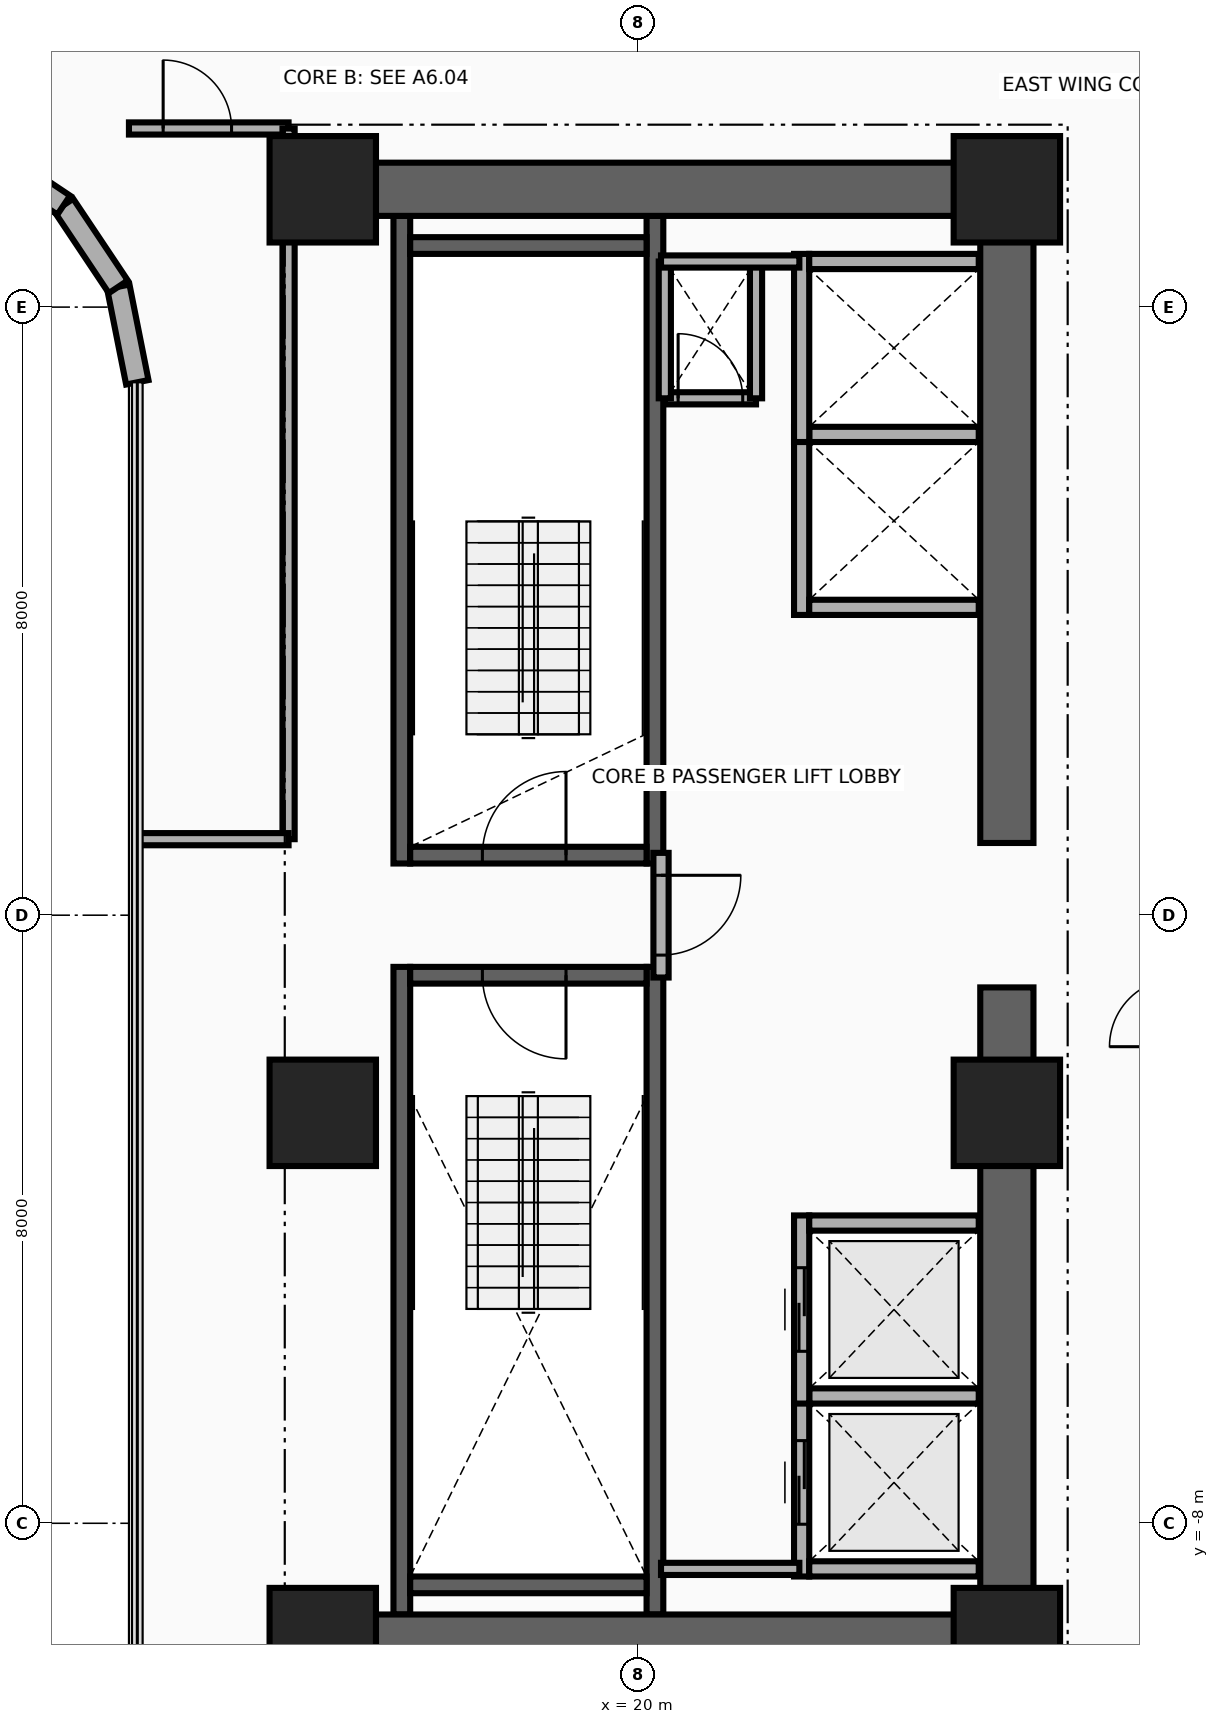
"""IFC4 building model, lengths in metres.
Left out: names, types, materials, properties, quantities, classifications, styles, units other than length and angle.
Written with IfcOpenShell. Run it as: python <this file> out.ifc"""

import sys

from ifc_helpers import new_model, si_unit, direction, frame, frame_2d, origin, origin_2d, place, context, subcontext, project, spatial, rectangle, extrude, source, transform, mapped, element, fill, save


model = new_model("IFC4")
c1 = context("Model", 3, precision=1e-05, world=origin(), true_north=direction((0.0, 1.0)))
c2 = subcontext(c1, "Body", "Model", "MODEL_VIEW")
j1 = project(units=[si_unit("LENGTHUNIT", "METRE"), si_unit("PLANEANGLEUNIT", "RADIAN")], contexts=[c1])
p1 = place(None, origin())
s1 = spatial("IfcSite", under=j1, at=p1, CompositionType="ELEMENT")
p2 = place(p1, origin())
s2 = spatial("IfcBuilding", under=s1, at=p2, CompositionType="ELEMENT")
p3 = place(p2, frame((0.0, 0.0, 33.4)))
s3 = spatial("IfcBuildingStorey", under=s2, at=p3, CompositionType="ELEMENT", Elevation=33.4)
for number, where, z_axis, x_axis in (
    (1, (16.89, 0.68, 0.0), (0.0, 0.0, 1.0), (0.0, 1.0, 0.0)),
    (2, (20.22, 0.68, 0.0), (0.0, 0.0, 1.0), (0.0, 1.0, 0.0)),
):
    element("IfcWall", number, at=place(p3, frame(where, z_axis=z_axis, x_axis=x_axis)), inside=s3, PredefinedType="SHEAR", context=c2, shape_type="SweptSolid", body=[
        extrude(rectangle(XDim=8.52, YDim=0.22, at=frame_2d((4.26, 0.0))), origin(), (0.0, 0.0, 1.0), 3.46),
    ])
p4 = place(p3, frame((17.0, 0.79, 0.0), z_axis=(0.0, 0.0, 1.0), x_axis=(1.0, 0.0, 0.0)))
e3 = element("IfcWall", 3, at=p4, inside=s3, PredefinedType="SHEAR", context=c2, shape_type="SweptSolid", body=[
    extrude(rectangle(XDim=3.11, YDim=0.22, at=frame_2d((1.555, 0.0))), origin(), (0.0, 0.0, 1.0), 3.46),
])
p5 = place(p4, frame((0.95, 0.0, 0.0)))
e4 = element("IfcOpeningElement", 4, at=p5, cuts=e3, PredefinedType="OPENING", context=c2, shape_type="SweptSolid", body=[
    extrude(rectangle(XDim=1.1, YDim=2.15, at=frame_2d((0.55, 1.075))), frame((0.0, 0.125, 0.0), z_axis=(0.0, -1.0, 0.0), x_axis=(1.0, 0.0, 0.0)), (0.0, 0.0, 1.0), 0.25),
])
p6 = place(p3, frame((17.0, 8.81, 0.0), z_axis=(0.0, 0.0, 1.0), x_axis=(1.0, 0.0, 0.0)))
e5 = element("IfcWall", 5, at=p6, inside=s3, PredefinedType="SHEAR", context=c2, shape_type="SweptSolid", body=[
    extrude(rectangle(XDim=3.11, YDim=0.22, at=frame_2d((1.555, 0.0))), origin(), (0.0, 0.0, 1.0), 3.46),
])
for number, where, z_axis, x_axis in (
    (6, (16.89, -9.2, 0.0), (0.0, 0.0, 1.0), (0.0, 1.0, 0.0)),
    (7, (20.22, -9.2, 0.0), (0.0, 0.0, 1.0), (0.0, 1.0, 0.0)),
):
    element("IfcWall", number, at=place(p3, frame(where, z_axis=z_axis, x_axis=x_axis)), inside=s3, PredefinedType="SHEAR", context=c2, shape_type="SweptSolid", body=[
        extrude(rectangle(XDim=8.52, YDim=0.22, at=frame_2d((4.26, 0.0))), origin(), (0.0, 0.0, 1.0), 3.46),
    ])
p7 = place(p3, frame((17.0, -8.81, 0.0), z_axis=(0.0, 0.0, 1.0), x_axis=(1.0, 0.0, 0.0)))
e8 = element("IfcWall", 8, at=p7, inside=s3, PredefinedType="SHEAR", context=c2, shape_type="SweptSolid", body=[
    extrude(rectangle(XDim=3.11, YDim=0.22, at=frame_2d((1.555, 0.0))), origin(), (0.0, 0.0, 1.0), 3.46),
])
p8 = place(p3, frame((17.0, -0.79, 0.0), z_axis=(0.0, 0.0, 1.0), x_axis=(1.0, 0.0, 0.0)))
e9 = element("IfcWall", 9, at=p8, inside=s3, PredefinedType="SHEAR", context=c2, shape_type="SweptSolid", body=[
    extrude(rectangle(XDim=3.11, YDim=0.22, at=frame_2d((1.555, 0.0))), origin(), (0.0, 0.0, 1.0), 3.46),
])
p9 = place(p8, frame((0.95, 0.0, 0.0)))
e10 = element("IfcOpeningElement", 10, at=p9, cuts=e9, PredefinedType="OPENING", context=c2, shape_type="SweptSolid", body=[
    extrude(rectangle(XDim=1.1, YDim=2.15, at=frame_2d((0.55, 1.075))), frame((0.0, 0.125, 0.0), z_axis=(0.0, -1.0, 0.0), x_axis=(1.0, 0.0, 0.0)), (0.0, 0.0, 1.0), 0.25),
])
for number, where, z_axis, x_axis in (
    (11, (24.85, -9.9, 0.0), (0.0, 0.0, 1.0), (0.0, 1.0, 0.0)),
    (12, (24.85, 0.95, 0.0), (0.0, 0.0, 1.0), (0.0, 1.0, 0.0)),
):
    element("IfcWall", number, at=place(p3, frame(where, z_axis=z_axis, x_axis=x_axis)), inside=s3, PredefinedType="SHEAR", context=c2, shape_type="SweptSolid", body=[
        extrude(rectangle(XDim=8.95, YDim=0.7, at=frame_2d((4.475, 0.0))), origin(), (0.0, 0.0, 1.0), 3.46),
    ])
for number, where, z_axis, x_axis in (
    (13, (15.85, 9.55, 0.0), (0.0, 0.0, 1.0), (1.0, 0.0, 0.0)),
    (14, (15.85, -9.55, 0.0), (0.0, 0.0, 1.0), (1.0, 0.0, 0.0)),
):
    element("IfcWall", number, at=place(p3, frame(where, z_axis=z_axis, x_axis=x_axis)), inside=s3, PredefinedType="SHEAR", context=c2, shape_type="SweptSolid", body=[
        extrude(rectangle(XDim=9.0, YDim=0.7, at=frame_2d((4.5, 0.0))), origin(), (0.0, 0.0, 1.0), 3.46),
    ])
m1 = source(origin(), c2, "Body", "SweptSolid", [
    extrude(rectangle(XDim=1.4, YDim=1.4, at=origin_2d()), origin(), (0.0, 0.0, 1.0), 3.7),
])
for number, where, z_axis, x_axis in (
    (15, (15.85, -9.55, 0.0), (0.0, 0.0, 1.0), (1.0, 0.0, 0.0)),
    (16, (24.85, -9.55, 0.0), (0.0, 0.0, 1.0), (1.0, 0.0, 0.0)),
    (17, (15.85, -2.6, 0.0), (0.0, 0.0, 1.0), (1.0, 0.0, 0.0)),
    (18, (24.85, -2.6, 0.0), (0.0, 0.0, 1.0), (1.0, 0.0, 0.0)),
    (19, (15.85, 9.55, 0.0), (0.0, 0.0, 1.0), (1.0, 0.0, 0.0)),
    (20, (24.85, 9.55, 0.0), (0.0, 0.0, 1.0), (1.0, 0.0, 0.0)),
):
    element("IfcColumn", number, at=place(p3, frame(where, z_axis=z_axis, x_axis=x_axis)), inside=s3, PredefinedType="COLUMN", context=c2, shape_type="MappedRepresentation", body=[
        mapped(m1, transform((0.0, 0.0, 0.0), x_axis=(1.0, 0.0, 0.0), y_axis=(0.0, 1.0, 0.0), z_axis=(0.0, 0.0, 1.0), scale=1.0)),
    ])
p10 = place(p3, frame((13.41, 7.011, 0.0), z_axis=(0.0, 0.0, 1.0), x_axis=(-0.195090163074, 0.980785312019, 0.0)))
e21 = element("IfcWall", 21, at=p10, inside=s3, PredefinedType="SOLIDWALL", context=c2, shape_type="SweptSolid", body=[
    extrude(rectangle(XDim=1.281, YDim=0.3, at=frame_2d((0.641, 0.0))), origin(), (0.0, 0.0, 1.0), 3.46),
])
for number, where, z_axis, x_axis in (
    (22, (13.16, 8.268, 0.0), (0.0, 0.0, 1.0), (-0.556, 0.831, 0.0)),
    (23, (12.442, 9.342, 0.0), (0.0, 0.0, 1.0), (-0.831, 0.556, 0.0)),
):
    element("IfcWall", number, at=place(p3, frame(where, z_axis=z_axis, x_axis=x_axis)), inside=s3, PredefinedType="SOLIDWALL", context=c2, shape_type="SweptSolid", body=[
        extrude(rectangle(XDim=1.292, YDim=0.3, at=frame_2d((0.646, 0.0))), origin(), (0.0, 0.0, 1.0), 3.46),
    ])
p11 = place(p3, frame((22.15, -8.7, 0.0), z_axis=(0.0, 0.0, 1.0), x_axis=(0.0, 1.0, 0.0)))
e24 = element("IfcWall", 24, at=p11, inside=s3, PredefinedType="MOVABLE", context=c2, shape_type="SweptSolid", body=[
    extrude(rectangle(XDim=2.475, YDim=0.2, at=frame_2d((1.237, 0.0))), origin(), (0.0, 0.0, 1.0), 3.46),
])
p12 = place(p11, frame((0.688, 0.0, 0.0)))
e25 = element("IfcOpeningElement", 25, at=p12, cuts=e24, PredefinedType="OPENING", context=c2, shape_type="SweptSolid", body=[
    extrude(rectangle(XDim=1.1, YDim=2.1, at=frame_2d((0.55, 1.05))), frame((0.0, 0.115, 0.0), z_axis=(0.0, -1.0, 0.0), x_axis=(1.0, 0.0, 0.0)), (0.0, 0.0, 1.0), 0.23),
])
for number, where, z_axis, x_axis in (
    (26, (22.25, -8.6, 0.0), (0.0, 0.0, 1.0), (1.0, 0.0, 0.0)),
    (27, (22.25, -6.325, 0.0), (0.0, 0.0, 1.0), (1.0, 0.0, 0.0)),
):
    element("IfcWall", number, at=place(p3, frame(where, z_axis=z_axis, x_axis=x_axis)), inside=s3, PredefinedType="MOVABLE", context=c2, shape_type="SweptSolid", body=[
        extrude(rectangle(XDim=2.23, YDim=0.2, at=frame_2d((1.115, 0.0))), origin(), (0.0, 0.0, 1.0), 3.46),
    ])
p13 = place(p3, frame((22.15, -6.425, 0.0), z_axis=(0.0, 0.0, 1.0), x_axis=(0.0, 1.0, 0.0)))
e28 = element("IfcWall", 28, at=p13, inside=s3, PredefinedType="MOVABLE", context=c2, shape_type="SweptSolid", body=[
    extrude(rectangle(XDim=2.475, YDim=0.2, at=frame_2d((1.238, 0.0))), origin(), (0.0, 0.0, 1.0), 3.46),
])
p14 = place(p13, frame((0.688, 0.0, 0.0)))
e29 = element("IfcOpeningElement", 29, at=p14, cuts=e28, PredefinedType="OPENING", context=c2, shape_type="SweptSolid", body=[
    extrude(rectangle(XDim=1.1, YDim=2.1, at=frame_2d((0.55, 1.05))), frame((0.0, 0.115, 0.0), z_axis=(0.0, -1.0, 0.0), x_axis=(1.0, 0.0, 0.0)), (0.0, 0.0, 1.0), 0.23),
])
p15 = place(p3, frame((22.25, -4.05, 0.0), z_axis=(0.0, 0.0, 1.0), x_axis=(1.0, 0.0, 0.0)))
e30 = element("IfcWall", 30, at=p15, inside=s3, PredefinedType="MOVABLE", context=c2, shape_type="SweptSolid", body=[
    extrude(rectangle(XDim=2.23, YDim=0.2, at=frame_2d((1.115, 0.0))), origin(), (0.0, 0.0, 1.0), 3.46),
])
p16 = place(p3, frame((22.15, 3.95, 0.0), z_axis=(0.0, 0.0, 1.0), x_axis=(0.0, 1.0, 0.0)))
e31 = element("IfcWall", 31, at=p16, inside=s3, PredefinedType="MOVABLE", context=c2, shape_type="SweptSolid", body=[
    extrude(rectangle(XDim=2.475, YDim=0.2, at=frame_2d((1.238, 0.0))), origin(), (0.0, 0.0, 1.0), 3.46),
])
for number, where, z_axis, x_axis in (
    (32, (22.25, 4.05, 0.0), (0.0, 0.0, 1.0), (1.0, 0.0, 0.0)),
    (33, (22.25, 6.325, 0.0), (0.0, 0.0, 1.0), (1.0, 0.0, 0.0)),
):
    element("IfcWall", number, at=place(p3, frame(where, z_axis=z_axis, x_axis=x_axis)), inside=s3, PredefinedType="MOVABLE", context=c2, shape_type="SweptSolid", body=[
        extrude(rectangle(XDim=2.23, YDim=0.2, at=frame_2d((1.115, 0.0))), origin(), (0.0, 0.0, 1.0), 2.245),
    ])
p17 = place(p3, frame((22.15, 6.225, 0.0), z_axis=(0.0, 0.0, 1.0), x_axis=(0.0, 1.0, 0.0)))
e34 = element("IfcWall", 34, at=p17, inside=s3, PredefinedType="MOVABLE", context=c2, shape_type="SweptSolid", body=[
    extrude(rectangle(XDim=2.475, YDim=0.2, at=frame_2d((1.237, 0.0))), origin(), (0.0, 0.0, 1.0), 3.46),
])
p18 = place(p3, frame((22.25, 8.6, 0.0), z_axis=(0.0, 0.0, 1.0), x_axis=(1.0, 0.0, 0.0)))
e35 = element("IfcWall", 35, at=p18, inside=s3, PredefinedType="MOVABLE", context=c2, shape_type="SweptSolid", body=[
    extrude(rectangle(XDim=2.23, YDim=0.2, at=frame_2d((1.115, 0.0))), origin(), (0.0, 0.0, 1.0), 2.245),
])
p19 = place(p3, frame((20.3, -0.82, 0.0), z_axis=(0.0, 0.0, 1.0), x_axis=(0.0, 1.0, 0.0)))
e36 = element("IfcWall", 36, at=p19, inside=s3, PredefinedType="PARTITIONING", context=c2, shape_type="SweptSolid", body=[
    extrude(rectangle(XDim=1.64, YDim=0.2, at=frame_2d((0.82, 0.0))), origin(), (0.0, 0.0, 1.0), 3.46),
])
p20 = place(p19, frame((0.295, 0.0, 0.0)))
e37 = element("IfcOpeningElement", 37, at=p20, cuts=e36, PredefinedType="OPENING", context=c2, shape_type="SweptSolid", body=[
    extrude(rectangle(XDim=1.05, YDim=2.15, at=frame_2d((0.525, 1.075))), frame((0.0, 0.115, 0.0), z_axis=(0.0, -1.0, 0.0), x_axis=(1.0, 0.0, 0.0)), (0.0, 0.0, 1.0), 0.23),
])
p21 = place(p3, frame((20.35, 6.8, 0.0), z_axis=(0.0, 0.0, 1.0), x_axis=(1.0, 0.0, 0.0)))
e38 = element("IfcWall", 38, at=p21, inside=s3, PredefinedType="PARTITIONING", context=c2, shape_type="SweptSolid", body=[
    extrude(rectangle(XDim=1.2, YDim=0.16, at=frame_2d((0.6, 0.0))), origin(), (0.0, 0.0, 1.0), 3.46),
])
p22 = place(p21, frame((0.175, 0.0, 0.0)))
e39 = element("IfcOpeningElement", 39, at=p22, cuts=e38, PredefinedType="OPENING", context=c2, shape_type="SweptSolid", body=[
    extrude(rectangle(XDim=0.85, YDim=2.05, at=frame_2d((0.425, 1.025))), frame((0.0, 0.095, 0.0), z_axis=(0.0, -1.0, 0.0), x_axis=(1.0, 0.0, 0.0)), (0.0, 0.0, 1.0), 0.19),
])
for number, where, z_axis, x_axis in (
    (40, (21.55, 6.8, 0.0), (0.0, 0.0, 1.0), (0.0, 1.0, 0.0)),
    (41, (20.35, 6.8, 0.0), (0.0, 0.0, 1.0), (0.0, 1.0, 0.0)),
):
    element("IfcWall", number, at=place(p3, frame(where, z_axis=z_axis, x_axis=x_axis)), inside=s3, PredefinedType="PARTITIONING", context=c2, shape_type="SweptSolid", body=[
        extrude(rectangle(XDim=1.8, YDim=0.16, at=frame_2d((0.9, 0.0))), origin(), (0.0, 0.0, 1.0), 3.46),
    ])
for number, where, z_axis, x_axis in (
    (42, (20.3, -8.6, 0.0), (0.0, 0.0, 1.0), (1.0, 0.0, 0.0)),
    (43, (20.3, 8.6, 0.0), (0.0, 0.0, 1.0), (1.0, 0.0, 0.0)),
):
    element("IfcWall", number, at=place(p3, frame(where, z_axis=z_axis, x_axis=x_axis)), inside=s3, PredefinedType="PARTITIONING", context=c2, shape_type="SweptSolid", body=[
        extrude(rectangle(XDim=1.82, YDim=0.16, at=frame_2d((0.91, 0.0))), origin(), (0.0, 0.0, 1.0), 3.46),
    ])
p23 = place(p3, frame((13.3, 10.35, 0.0), z_axis=(0.0, 0.0, 1.0), x_axis=(1.0, 0.0, 0.0)))
e44 = element("IfcWall", 44, at=p23, inside=s3, PredefinedType="PARTITIONING", context=c2, shape_type="SweptSolid", body=[
    extrude(rectangle(XDim=2.1, YDim=0.16, at=frame_2d((1.05, 0.0))), origin(), (0.0, 0.0, 1.0), 2.583),
])
p24 = place(p23, frame((0.45, 0.0, 0.0)))
e45 = element("IfcOpeningElement", 45, at=p24, cuts=e44, PredefinedType="OPENING", context=c2, shape_type="SweptSolid", body=[
    extrude(rectangle(XDim=0.9, YDim=2.1, at=frame_2d((0.45, 1.05))), frame((0.0, 0.095, 0.0), z_axis=(0.0, -1.0, 0.0), x_axis=(1.0, 0.0, 0.0)), (0.0, 0.0, 1.0), 0.19),
])
p25 = place(p3, frame((15.4, 1.0, 0.0), z_axis=(0.0, 0.0, 1.0), x_axis=(0.0, 1.0, 0.0)))
e46 = element("IfcWall", 46, at=p25, inside=s3, PredefinedType="PARTITIONING", context=c2, shape_type="SweptSolid", body=[
    extrude(rectangle(XDim=9.35, YDim=0.16, at=frame_2d((4.675, 0.0))), origin(), (0.0, 0.0, 1.0), 2.245),
])
p26 = place(p3, frame((13.41, 1.0, 0.0), z_axis=(0.0, 0.0, 1.0), x_axis=(1.0, 0.0, 0.0)))
e47 = element("IfcWall", 47, at=p26, inside=s3, PredefinedType="PARTITIONING", context=c2, shape_type="SweptSolid", body=[
    extrude(rectangle(XDim=1.99, YDim=0.16, at=frame_2d((0.995, 0.0))), origin(), (0.0, 0.0, 1.0), 2.245),
])
p27 = place(p12, origin())
e48 = element("IfcDoor", 48, at=p27, inside=s3, OperationType="DOUBLE_DOOR_SLIDING", PredefinedType="DOOR", context=c2, shape_type="SweptSolid", body=[
    extrude(rectangle(XDim=1.1, YDim=2.1, at=frame_2d((0.55, 1.05))), frame((0.0, 0.025, 0.0), z_axis=(0.0, -1.0, 0.0), x_axis=(1.0, 0.0, 0.0)), (0.0, 0.0, 1.0), 0.05),
])
fill(e25, e48)
p28 = place(p14, origin())
e49 = element("IfcDoor", 49, at=p28, inside=s3, OperationType="DOUBLE_DOOR_SLIDING", PredefinedType="DOOR", context=c2, shape_type="SweptSolid", body=[
    extrude(rectangle(XDim=1.1, YDim=2.1, at=frame_2d((0.55, 1.05))), frame((0.0, 0.025, 0.0), z_axis=(0.0, -1.0, 0.0), x_axis=(1.0, 0.0, 0.0)), (0.0, 0.0, 1.0), 0.05),
])
fill(e29, e49)
p29 = place(p20, frame((1.05, 0.0, 0.0), z_axis=(0.0, 0.0, 1.0), x_axis=(-1.0, 0.0, 0.0)))
e50 = element("IfcDoor", 50, at=p29, inside=s3, OperationType="SINGLE_SWING_LEFT", PredefinedType="DOOR", context=c2, shape_type="SweptSolid", body=[
    extrude(rectangle(XDim=1.05, YDim=2.15, at=frame_2d((0.525, 1.075))), frame((0.0, 0.025, 0.0), z_axis=(0.0, -1.0, 0.0), x_axis=(1.0, 0.0, 0.0)), (0.0, 0.0, 1.0), 0.05),
])
fill(e37, e50)
p30 = place(p5, origin())
e51 = element("IfcDoor", 51, at=p30, inside=s3, OperationType="SINGLE_SWING_RIGHT", PredefinedType="DOOR", context=c2, shape_type="SweptSolid", body=[
    extrude(rectangle(XDim=1.1, YDim=2.15, at=frame_2d((0.55, 1.075))), frame((0.0, 0.025, 0.0), z_axis=(0.0, -1.0, 0.0), x_axis=(1.0, 0.0, 0.0)), (0.0, 0.0, 1.0), 0.05),
])
fill(e4, e51)
p31 = place(p9, frame((1.1, 0.0, 0.0), z_axis=(0.0, 0.0, 1.0), x_axis=(-1.0, 0.0, 0.0)))
e52 = element("IfcDoor", 52, at=p31, inside=s3, OperationType="SINGLE_SWING_LEFT", PredefinedType="DOOR", context=c2, shape_type="SweptSolid", body=[
    extrude(rectangle(XDim=1.1, YDim=2.15, at=frame_2d((0.55, 1.075))), frame((0.0, 0.025, 0.0), z_axis=(0.0, -1.0, 0.0), x_axis=(1.0, 0.0, 0.0)), (0.0, 0.0, 1.0), 0.05),
])
fill(e10, e52)
p32 = place(p22, origin())
e53 = element("IfcDoor", 53, at=p32, inside=s3, OperationType="SINGLE_SWING_RIGHT", PredefinedType="DOOR", context=c2, shape_type="SweptSolid", body=[
    extrude(rectangle(XDim=0.85, YDim=2.05, at=frame_2d((0.425, 1.025))), frame((0.0, 0.025, 0.0), z_axis=(0.0, -1.0, 0.0), x_axis=(1.0, 0.0, 0.0)), (0.0, 0.0, 1.0), 0.05),
])
fill(e39, e53)
p33 = place(p24, origin())
e54 = element("IfcDoor", 54, at=p33, inside=s3, OperationType="SINGLE_SWING_RIGHT", PredefinedType="DOOR", context=c2, shape_type="SweptSolid", body=[
    extrude(rectangle(XDim=0.9, YDim=2.1, at=frame_2d((0.45, 1.05))), frame((0.0, 0.025, 0.0), z_axis=(0.0, -1.0, 0.0), x_axis=(1.0, 0.0, 0.0)), (0.0, 0.0, 1.0), 0.05),
])
fill(e45, e54)
save(model, sys.argv[1])
